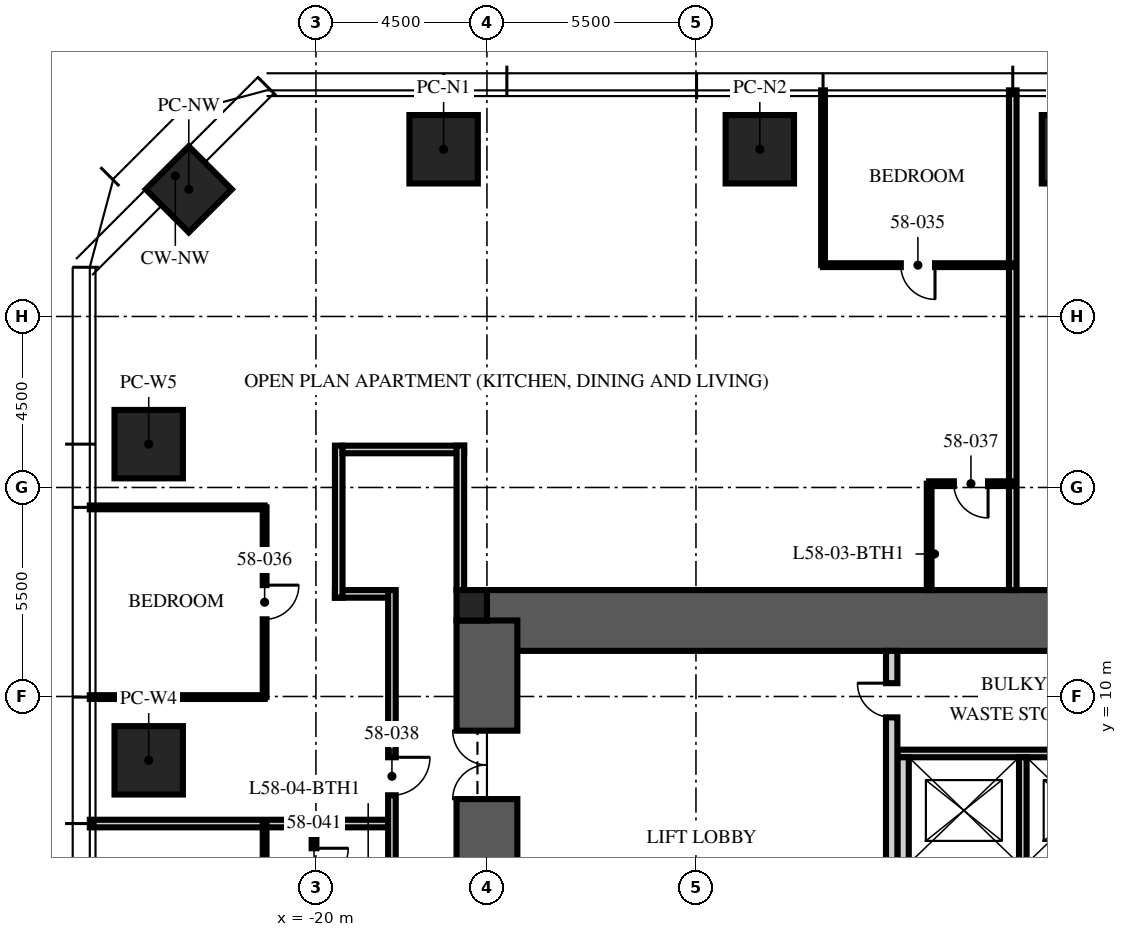
"""IFC4 building model, lengths in metres.
Left out: names, types, materials, properties, quantities, classifications, styles, units other than length and angle.
Written with IfcOpenShell. Run it as: python <this file> out.ifc"""

import sys

from ifc_helpers import new_model, si_unit, direction, frame, frame_2d, origin, origin_2d, place, context, subcontext, project, spatial, rectangle, extrude, element, fill, save


model = new_model("IFC4")
c1 = context("Model", 3, precision=1e-05, world=origin(), true_north=direction((0.0, 1.0)))
c2 = subcontext(c1, "Body", "Model", "MODEL_VIEW")
j1 = project(units=[si_unit("LENGTHUNIT", "METRE"), si_unit("PLANEANGLEUNIT", "RADIAN")], contexts=[c1])
p1 = place(None, origin())
s1 = spatial("IfcSite", under=j1, at=p1, CompositionType="ELEMENT")
p2 = place(p1, origin())
s2 = spatial("IfcBuilding", under=s1, at=p2, CompositionType="ELEMENT")
p3 = place(p2, frame((0.0, 0.0, 233.25)))
s3 = spatial("IfcBuildingStorey", under=s2, at=p3, CompositionType="ELEMENT", Elevation=233.25)
p4 = place(p3, frame((-15.5, 12.0, -0.25), z_axis=(0.0, 0.0, 1.0), x_axis=(1.0, 0.0, 0.0)))
e1 = element("IfcWall", 1, at=p4, inside=s3, PredefinedType="SHEAR", context=c2, shape_type="SweptSolid", body=[
    extrude(rectangle(XDim=31.0, YDim=1.6, at=frame_2d((15.5, 0.0))), origin(), (0.0, 0.0, 1.0), 3.75),
])
p5 = place(p3, frame((-15.5, -12.0, -0.25), z_axis=(0.0, 0.0, 1.0), x_axis=(0.0, 1.0, 0.0)))
e2 = element("IfcWall", 2, at=p5, inside=s3, PredefinedType="SHEAR", context=c2, shape_type="SweptSolid", body=[
    extrude(rectangle(XDim=24.0, YDim=1.6, at=frame_2d((12.0, 0.0))), origin(), (0.0, 0.0, 1.0), 3.75),
])
p6 = place(p5, frame((3.2, 0.0, 0.25)))
e3 = element("IfcOpeningElement", 3, at=p6, cuts=e2, PredefinedType="OPENING", context=c2, shape_type="SweptSolid", body=[
    extrude(rectangle(XDim=1.2, YDim=2.1, at=frame_2d((0.6, 1.05))), frame((0.0, 0.81, 0.0), z_axis=(0.0, -1.0, 0.0), x_axis=(1.0, 0.0, 0.0)), (0.0, 0.0, 1.0), 1.62),
])
p7 = place(p5, frame((19.3, 0.0, 0.25)))
e4 = element("IfcOpeningElement", 4, at=p7, cuts=e2, PredefinedType="OPENING", context=c2, shape_type="SweptSolid", body=[
    extrude(rectangle(XDim=1.8, YDim=2.1, at=frame_2d((0.9, 1.05))), frame((0.0, 0.81, 0.0), z_axis=(0.0, -1.0, 0.0), x_axis=(1.0, 0.0, 0.0)), (0.0, 0.0, 1.0), 1.62),
])
p8 = place(p3, frame((-15.9, 12.4, -0.25), z_axis=(0.0, 0.0, 1.0), x_axis=(1.0, 0.0, 0.0)))
e5 = element("IfcColumn", 5, at=p8, inside=s3, PredefinedType="COLUMN", context=c2, shape_type="SweptSolid", body=[
    extrude(rectangle(XDim=0.8, YDim=0.8, at=origin_2d()), origin(), (0.0, 0.0, 1.0), 3.75),
])
for number, where, z_axis, x_axis in (
    (6, (-16.64, 24.4, 0.0), (0.0, 0.0, 1.0), (1.0, 0.0, 0.0)),
    (7, (-8.32, 24.4, 0.0), (0.0, 0.0, 1.0), (1.0, 0.0, 0.0)),
    (8, (0.0, 24.4, 0.0), (0.0, 0.0, 1.0), (1.0, 0.0, 0.0)),
    (9, (-24.4, 8.32, 0.0), (0.0, 0.0, 1.0), (0.0, 1.0, 0.0)),
    (10, (-24.4, 16.64, 0.0), (0.0, 0.0, 1.0), (0.0, 1.0, 0.0)),
):
    element("IfcColumn", number, at=place(p3, frame(where, z_axis=z_axis, x_axis=x_axis)), inside=s3, PredefinedType="COLUMN", context=c2, shape_type="SweptSolid", body=[
        extrude(rectangle(XDim=1.8, YDim=1.8, at=origin_2d()), origin(), (0.0, 0.0, 1.0), 3.75),
    ])
p9 = place(p3, frame((-23.346, 23.346, 0.0), z_axis=(0.0, 0.0, 1.0), x_axis=(0.707106781187, 0.707106781187, 0.0)))
e11 = element("IfcColumn", 11, at=p9, inside=s3, PredefinedType="COLUMN", context=c2, shape_type="SweptSolid", body=[
    extrude(rectangle(XDim=1.6, YDim=1.6, at=origin_2d()), origin(), (0.0, 0.0, 1.0), 3.75),
])
p10 = place(p3, frame((-4.7, 8.5, 0.0), z_axis=(0.0, 0.0, 1.0), x_axis=(1.0, 0.0, 0.0)))
e12 = element("IfcWall", 12, at=p10, inside=s3, PredefinedType="PARTITIONING", context=c2, shape_type="SweptSolid", body=[
    extrude(rectangle(XDim=9.7, YDim=0.2, at=frame_2d((4.85, 0.0))), origin(), (0.0, 0.0, 1.0), 3.5),
])
p11 = place(p3, frame((-4.55, 5.6, 0.0), z_axis=(0.0, 0.0, 1.0), x_axis=(0.0, 1.0, 0.0)))
e13 = element("IfcWall", 13, at=p11, inside=s3, PredefinedType="PARTITIONING", context=c2, shape_type="SweptSolid", body=[
    extrude(rectangle(XDim=2.8, YDim=0.3, at=frame_2d((1.4, 0.0))), origin(), (0.0, 0.0, 1.0), 3.5),
])
p12 = place(p3, frame((-1.4, 5.6, 0.0), z_axis=(0.0, 0.0, 1.0), x_axis=(0.0, 1.0, 0.0)))
e14 = element("IfcWall", 14, at=p12, inside=s3, PredefinedType="PARTITIONING", context=c2, shape_type="SweptSolid", body=[
    extrude(rectangle(XDim=2.8, YDim=0.2, at=frame_2d((1.4, 0.0))), origin(), (0.0, 0.0, 1.0), 3.5),
])
p13 = place(p3, frame((-4.85, 5.3, 0.0), z_axis=(0.0, 0.0, 1.0), x_axis=(0.0, 1.0, 0.0)))
e15 = element("IfcWall", 15, at=p13, inside=s3, PredefinedType="PARTITIONING", context=c2, shape_type="SweptSolid", body=[
    extrude(rectangle(XDim=5.9, YDim=0.3, at=frame_2d((2.95, 0.0))), origin(), (0.0, 0.0, 1.0), 3.5),
])
p14 = place(p13, frame((4.15, 0.0, 0.0)))
e16 = element("IfcOpeningElement", 16, at=p14, cuts=e15, PredefinedType="OPENING", context=c2, shape_type="SweptSolid", body=[
    extrude(rectangle(XDim=0.9, YDim=2.1, at=frame_2d((0.45, 1.05))), frame((0.0, 0.16, 0.0), z_axis=(0.0, -1.0, 0.0), x_axis=(1.0, 0.0, 0.0)), (0.0, 0.0, 1.0), 0.32),
])
p15 = place(p3, frame((-18.1, 12.7, 0.0), z_axis=(0.0, 0.0, 1.0), x_axis=(-1.0, 0.0, 0.0)))
e17 = element("IfcWall", 17, at=p15, inside=s3, PredefinedType="PARTITIONING", context=c2, shape_type="SweptSolid", body=[
    extrude(rectangle(XDim=1.4, YDim=0.2, at=frame_2d((0.7, 0.0))), origin(), (0.0, 0.0, 1.0), 2.81),
])
p16 = place(p3, frame((-19.4, 12.6, 0.0), z_axis=(0.0, 0.0, 1.0), x_axis=(0.0, 1.0, 0.0)))
e18 = element("IfcWall", 18, at=p16, inside=s3, PredefinedType="PARTITIONING", context=c2, shape_type="SweptSolid", body=[
    extrude(rectangle(XDim=4.0, YDim=0.2, at=frame_2d((2.0, 0.0))), origin(), (0.0, 0.0, 1.0), 2.6),
])
p17 = place(p3, frame((-19.3, 16.5, 0.0), z_axis=(0.0, 0.0, 1.0), x_axis=(1.0, 0.0, 0.0)))
e19 = element("IfcWall", 19, at=p17, inside=s3, PredefinedType="PARTITIONING", context=c2, shape_type="SweptSolid", body=[
    extrude(rectangle(XDim=3.2, YDim=0.2, at=frame_2d((1.6, 0.0))), origin(), (0.0, 0.0, 1.0), 2.3),
])
p18 = place(p3, frame((-16.2, 16.6, 0.0), z_axis=(0.0, 0.0, 1.0), x_axis=(0.0, -1.0, 0.0)))
e20 = element("IfcWall", 20, at=p18, inside=s3, PredefinedType="PARTITIONING", context=c2, shape_type="SweptSolid", body=[
    extrude(rectangle(XDim=3.8, YDim=0.2, at=frame_2d((1.9, 0.0))), origin(), (0.0, 0.0, 1.0), 2.3),
])
p19 = place(p3, frame((-1.664, 12.8, 0.0), z_axis=(0.0, 0.0, 1.0), x_axis=(0.0, 1.0, 0.0)))
e21 = element("IfcWall", 21, at=p19, inside=s3, PredefinedType="PARTITIONING", context=c2, shape_type="SweptSolid", body=[
    extrude(rectangle(XDim=13.15, YDim=0.2, at=frame_2d((6.575, 0.0))), origin(), (0.0, 0.0, 1.0), 2.91),
])
for number, where, z_axis, x_axis in (
    (22, (-6.656, 21.35, 0.0), (0.0, 0.0, 1.0), (0.0, 1.0, 0.0)),
    (23, (-21.35, 14.976, 0.0), (0.0, 0.0, 1.0), (-1.0, 0.0, 0.0)),
    (24, (-21.35, 9.984, 0.0), (0.0, 0.0, 1.0), (-1.0, 0.0, 0.0)),
):
    element("IfcWall", number, at=place(p3, frame(where, z_axis=z_axis, x_axis=x_axis)), inside=s3, PredefinedType="PARTITIONING", context=c2, shape_type="SweptSolid", body=[
        extrude(rectangle(XDim=4.6, YDim=0.1, at=frame_2d((2.3, 0.0))), origin(), (0.0, 0.0, 1.0), 2.91),
    ])
p20 = place(p3, frame((-18.1, 6.656, 0.0), z_axis=(0.0, 0.0, 1.0), x_axis=(-1.0, 0.0, 0.0)))
e25 = element("IfcWall", 25, at=p20, inside=s3, PredefinedType="PARTITIONING", context=c2, shape_type="SweptSolid", body=[
    extrude(rectangle(XDim=7.85, YDim=0.2, at=frame_2d((3.925, 0.0))), origin(), (0.0, 0.0, 1.0), 2.91),
])
p21 = place(p3, frame((-1.664, 21.35, 0.0), z_axis=(0.0, 0.0, 1.0), x_axis=(-1.0, 0.0, 0.0)))
e26 = element("IfcWall", 26, at=p21, inside=s3, PredefinedType="PARTITIONING", context=c2, shape_type="SweptSolid", body=[
    extrude(rectangle(XDim=4.992, YDim=0.1, at=frame_2d((2.496, 0.0))), origin(), (0.0, 0.0, 1.0), 2.81),
])
p22 = place(p21, frame((2.046, 0.0, 0.0)))
e27 = element("IfcOpeningElement", 27, at=p22, cuts=e26, PredefinedType="OPENING", context=c2, shape_type="SweptSolid", body=[
    extrude(rectangle(XDim=0.9, YDim=2.1, at=frame_2d((0.45, 1.05))), frame((0.0, 0.06, 0.0), z_axis=(0.0, -1.0, 0.0), x_axis=(1.0, 0.0, 0.0)), (0.0, 0.0, 1.0), 0.12),
])
p23 = place(p3, frame((-21.35, 14.976, 0.0), z_axis=(0.0, 0.0, 1.0), x_axis=(0.0, -1.0, 0.0)))
e28 = element("IfcWall", 28, at=p23, inside=s3, PredefinedType="PARTITIONING", context=c2, shape_type="SweptSolid", body=[
    extrude(rectangle(XDim=4.992, YDim=0.1, at=frame_2d((2.496, 0.0))), origin(), (0.0, 0.0, 1.0), 2.81),
])
p24 = place(p23, frame((2.046, 0.0, 0.0)))
e29 = element("IfcOpeningElement", 29, at=p24, cuts=e28, PredefinedType="OPENING", context=c2, shape_type="SweptSolid", body=[
    extrude(rectangle(XDim=0.9, YDim=2.1, at=frame_2d((0.45, 1.05))), frame((0.0, 0.06, 0.0), z_axis=(0.0, -1.0, 0.0), x_axis=(1.0, 0.0, 0.0)), (0.0, 0.0, 1.0), 0.12),
])
p25 = place(p3, frame((-1.664, 15.6, 0.0), z_axis=(0.0, 0.0, 1.0), x_axis=(-1.0, 0.0, 0.0)))
e30 = element("IfcWall", 30, at=p25, inside=s3, PredefinedType="PARTITIONING", context=c2, shape_type="SweptSolid", body=[
    extrude(rectangle(XDim=2.2, YDim=0.125, at=frame_2d((1.1, 0.0))), origin(), (0.0, 0.0, 1.0), 3.5),
])
p26 = place(p25, frame((0.65, 0.0, 0.0)))
e31 = element("IfcOpeningElement", 31, at=p26, cuts=e30, PredefinedType="OPENING", context=c2, shape_type="SweptSolid", body=[
    extrude(rectangle(XDim=0.9, YDim=2.1, at=frame_2d((0.45, 1.05))), frame((0.0, 0.073, 0.0), z_axis=(0.0, -1.0, 0.0), x_axis=(1.0, 0.0, 0.0)), (0.0, 0.0, 1.0), 0.145),
])
p27 = place(p3, frame((-3.864, 12.8, 0.0), z_axis=(0.0, 0.0, 1.0), x_axis=(0.0, 1.0, 0.0)))
e32 = element("IfcWall", 32, at=p27, inside=s3, PredefinedType="PARTITIONING", context=c2, shape_type="SweptSolid", body=[
    extrude(rectangle(XDim=2.8, YDim=0.125, at=frame_2d((1.4, 0.0))), origin(), (0.0, 0.0, 1.0), 3.5),
])
p28 = place(p3, frame((-21.35, 6.656, 0.0), z_axis=(0.0, 0.0, 1.0), x_axis=(0.0, -1.0, 0.0)))
e33 = element("IfcWall", 33, at=p28, inside=s3, PredefinedType="PARTITIONING", context=c2, shape_type="SweptSolid", body=[
    extrude(rectangle(XDim=4.992, YDim=0.1, at=frame_2d((2.496, 0.0))), origin(), (0.0, 0.0, 1.0), 2.81),
])
p29 = place(p28, frame((2.046, 0.0, 0.0)))
e34 = element("IfcOpeningElement", 34, at=p29, cuts=e33, PredefinedType="OPENING", context=c2, shape_type="SweptSolid", body=[
    extrude(rectangle(XDim=0.9, YDim=2.1, at=frame_2d((0.45, 1.05))), frame((0.0, 0.06, 0.0), z_axis=(0.0, -1.0, 0.0), x_axis=(1.0, 0.0, 0.0)), (0.0, 0.0, 1.0), 0.12),
])
p30 = place(p3, frame((-20.05, 6.656, 0.0), z_axis=(0.0, 0.0, 1.0), x_axis=(0.0, -1.0, 0.0)))
e35 = element("IfcWall", 35, at=p30, inside=s3, PredefinedType="PARTITIONING", context=c2, shape_type="SweptSolid", body=[
    extrude(rectangle(XDim=2.2, YDim=0.125, at=frame_2d((1.1, 0.0))), origin(), (0.0, 0.0, 1.0), 3.5),
])
p31 = place(p30, frame((0.65, 0.0, 0.0)))
e36 = element("IfcOpeningElement", 36, at=p31, cuts=e35, PredefinedType="OPENING", context=c2, shape_type="SweptSolid", body=[
    extrude(rectangle(XDim=0.9, YDim=2.1, at=frame_2d((0.45, 1.05))), frame((0.0, 0.073, 0.0), z_axis=(0.0, -1.0, 0.0), x_axis=(1.0, 0.0, 0.0)), (0.0, 0.0, 1.0), 0.145),
])
p32 = place(p3, frame((-18.0, 12.8, 0.0), z_axis=(0.0, 0.0, 1.0), x_axis=(0.0, -1.0, 0.0)))
e37 = element("IfcWall", 37, at=p32, inside=s3, PredefinedType="PARTITIONING", context=c2, shape_type="SweptSolid", body=[
    extrude(rectangle(XDim=25.8, YDim=0.2, at=frame_2d((12.9, 0.0))), origin(), (0.0, 0.0, 1.0), 2.6),
])
p33 = place(p32, frame((4.4, 0.0, 0.0)))
e38 = element("IfcOpeningElement", 38, at=p33, cuts=e37, PredefinedType="OPENING", context=c2, shape_type="SweptSolid", body=[
    extrude(rectangle(XDim=1.0, YDim=2.2, at=frame_2d((0.5, 1.1))), frame((0.0, 0.11, 0.0), z_axis=(0.0, -1.0, 0.0), x_axis=(1.0, 0.0, 0.0)), (0.0, 0.0, 1.0), 0.22),
])
p34 = place(p32, frame((21.164, 0.0, 0.0)))
e39 = element("IfcOpeningElement", 39, at=p34, cuts=e37, PredefinedType="OPENING", context=c2, shape_type="SweptSolid", body=[
    extrude(rectangle(XDim=1.0, YDim=2.2, at=frame_2d((0.5, 1.1))), frame((0.0, 0.11, 0.0), z_axis=(0.0, -1.0, 0.0), x_axis=(1.0, 0.0, 0.0)), (0.0, 0.0, 1.0), 0.22),
])
p35 = place(p32, frame((23.554, 0.0, 0.0)))
e40 = element("IfcOpeningElement", 40, at=p35, cuts=e37, PredefinedType="OPENING", context=c2, shape_type="SweptSolid", body=[
    extrude(rectangle(XDim=1.0, YDim=2.2, at=frame_2d((0.5, 1.1))), frame((0.0, 0.11, 0.0), z_axis=(0.0, -1.0, 0.0), x_axis=(1.0, 0.0, 0.0)), (0.0, 0.0, 1.0), 0.22),
])
p36 = place(p7, origin())
e41 = element("IfcDoor", 41, at=p36, inside=s3, OperationType="DOUBLE_DOOR_SINGLE_SWING", PredefinedType="DOOR", context=c2, shape_type="SweptSolid", body=[
    extrude(rectangle(XDim=1.8, YDim=2.1, at=frame_2d((0.9, 1.05))), frame((0.0, 0.025, 0.0), z_axis=(0.0, -1.0, 0.0), x_axis=(1.0, 0.0, 0.0)), (0.0, 0.0, 1.0), 0.05),
])
fill(e4, e41)
p37 = place(p14, origin())
e42 = element("IfcDoor", 42, at=p37, inside=s3, OperationType="SINGLE_SWING_RIGHT", PredefinedType="DOOR", context=c2, shape_type="SweptSolid", body=[
    extrude(rectangle(XDim=0.9, YDim=2.1, at=frame_2d((0.45, 1.05))), frame((0.0, 0.025, 0.0), z_axis=(0.0, -1.0, 0.0), x_axis=(1.0, 0.0, 0.0)), (0.0, 0.0, 1.0), 0.05),
])
fill(e16, e42)
p38 = place(p22, origin())
e43 = element("IfcDoor", 43, at=p38, inside=s3, OperationType="SINGLE_SWING_LEFT", PredefinedType="DOOR", context=c2, shape_type="SweptSolid", body=[
    extrude(rectangle(XDim=0.9, YDim=2.1, at=frame_2d((0.45, 1.05))), frame((0.0, 0.025, 0.0), z_axis=(0.0, -1.0, 0.0), x_axis=(1.0, 0.0, 0.0)), (0.0, 0.0, 1.0), 0.05),
])
fill(e27, e43)
p39 = place(p24, origin())
e44 = element("IfcDoor", 44, at=p39, inside=s3, OperationType="SINGLE_SWING_LEFT", PredefinedType="DOOR", context=c2, shape_type="SweptSolid", body=[
    extrude(rectangle(XDim=0.9, YDim=2.1, at=frame_2d((0.45, 1.05))), frame((0.0, 0.025, 0.0), z_axis=(0.0, -1.0, 0.0), x_axis=(1.0, 0.0, 0.0)), (0.0, 0.0, 1.0), 0.05),
])
fill(e29, e44)
p40 = place(p26, origin())
e45 = element("IfcDoor", 45, at=p40, inside=s3, OperationType="SINGLE_SWING_LEFT", PredefinedType="DOOR", context=c2, shape_type="SweptSolid", body=[
    extrude(rectangle(XDim=0.9, YDim=2.1, at=frame_2d((0.45, 1.05))), frame((0.0, 0.025, 0.0), z_axis=(0.0, -1.0, 0.0), x_axis=(1.0, 0.0, 0.0)), (0.0, 0.0, 1.0), 0.05),
])
fill(e31, e45)
p41 = place(p33, origin())
e46 = element("IfcDoor", 46, at=p41, inside=s3, OperationType="SINGLE_SWING_LEFT", PredefinedType="DOOR", context=c2, shape_type="SweptSolid", body=[
    extrude(rectangle(XDim=1.0, YDim=2.2, at=frame_2d((0.5, 1.1))), frame((0.0, 0.025, 0.0), z_axis=(0.0, -1.0, 0.0), x_axis=(1.0, 0.0, 0.0)), (0.0, 0.0, 1.0), 0.05),
])
fill(e38, e46)
p42 = place(p31, origin())
e47 = element("IfcDoor", 47, at=p42, inside=s3, OperationType="SINGLE_SWING_LEFT", PredefinedType="DOOR", context=c2, shape_type="SweptSolid", body=[
    extrude(rectangle(XDim=0.9, YDim=2.1, at=frame_2d((0.45, 1.05))), frame((0.0, 0.025, 0.0), z_axis=(0.0, -1.0, 0.0), x_axis=(1.0, 0.0, 0.0)), (0.0, 0.0, 1.0), 0.05),
])
fill(e36, e47)
save(model, sys.argv[1])
